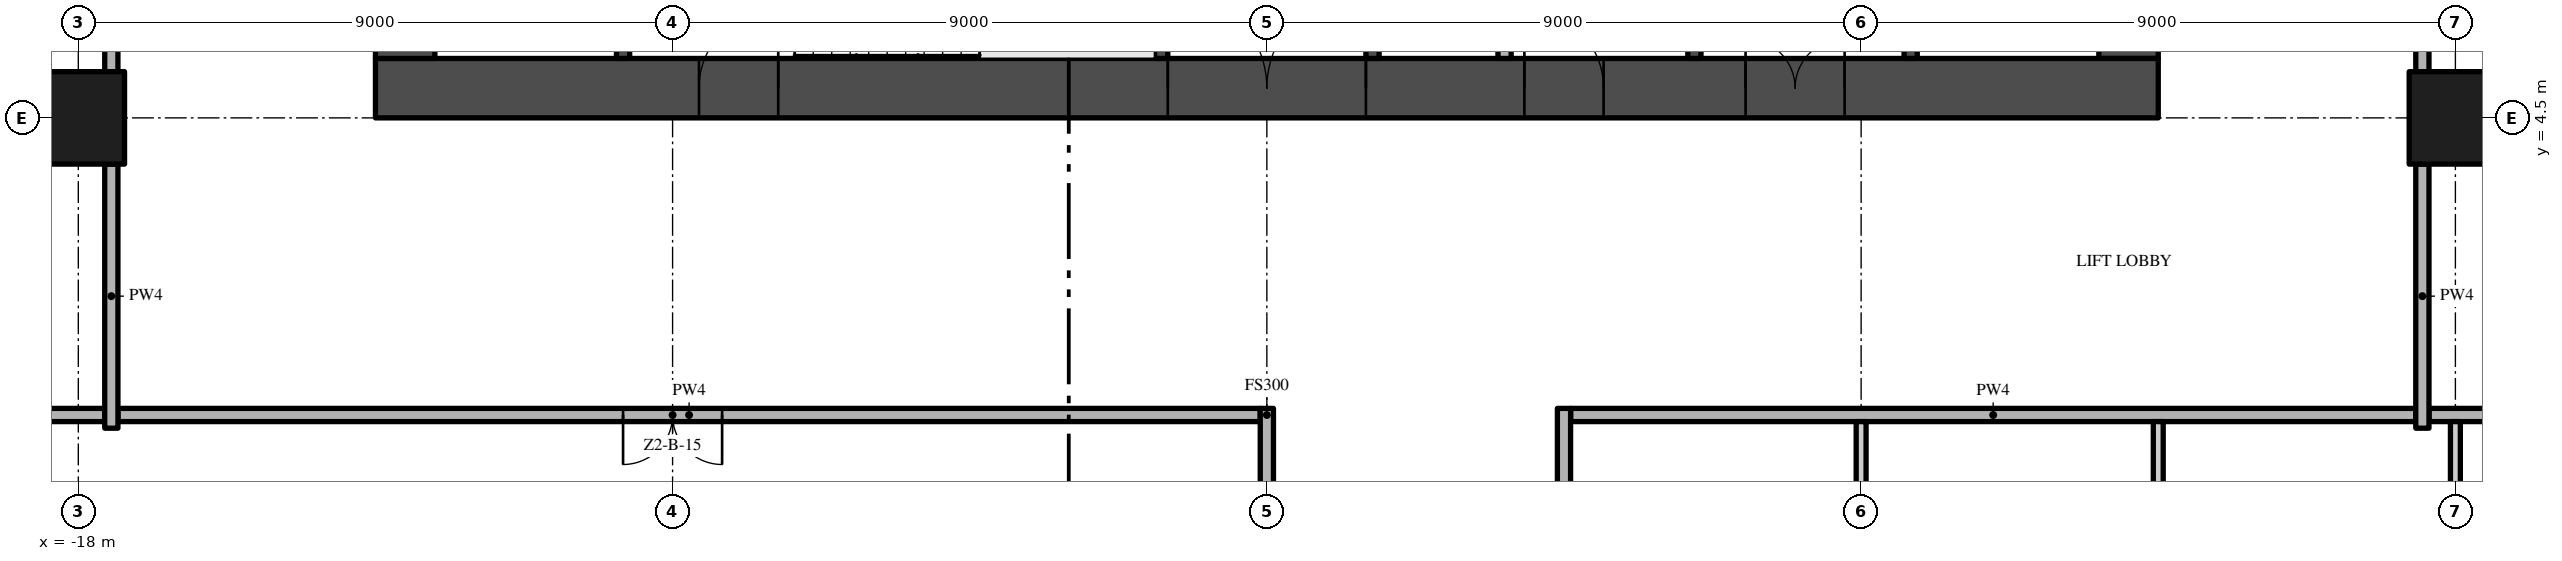
"""IFC4 building model, lengths in metres.
Left out: names, types, materials, properties, quantities, classifications, styles, units other than length and angle.
Written with IfcOpenShell. Run it as: python <this file> out.ifc"""

import sys

from ifc_helpers import new_model, si_unit, direction, frame, frame_2d, origin, origin_2d, place, context, subcontext, project, spatial, rectangle, extrude, element, fill, save


model = new_model("IFC4")
c1 = context("Model", 3, precision=1e-05, world=origin(), true_north=direction((0.0, 1.0)))
c2 = subcontext(c1, "Body", "Model", "MODEL_VIEW")
j1 = project(units=[si_unit("LENGTHUNIT", "METRE"), si_unit("PLANEANGLEUNIT", "RADIAN")], contexts=[c1])
p1 = place(None, origin())
s1 = spatial("IfcSite", under=j1, at=p1, CompositionType="ELEMENT")
p2 = place(p1, origin())
s2 = spatial("IfcBuilding", under=s1, at=p2, CompositionType="ELEMENT")
p3 = place(p2, frame((0.0, 0.0, 88.4)))
s3 = spatial("IfcBuildingStorey", under=s2, at=p3, CompositionType="ELEMENT", Elevation=88.4)
p4 = place(p3, frame((-13.5, 4.95, -0.3), z_axis=(0.0, 0.0, 1.0), x_axis=(1.0, 0.0, 0.0)))
e1 = element("IfcWall", 1, at=p4, inside=s3, PredefinedType="SHEAR", context=c2, shape_type="SweptSolid", body=[
    extrude(rectangle(XDim=27.0, YDim=0.9, at=frame_2d((13.5, 0.0))), origin(), (0.0, 0.0, 1.0), 3.8),
])
p5 = place(p4, frame((12.0, 0.0, 0.3)))
e2 = element("IfcOpeningElement", 2, at=p5, cuts=e1, PredefinedType="OPENING", context=c2, shape_type="SweptSolid", body=[
    extrude(rectangle(XDim=3.0, YDim=2.4, at=frame_2d((1.5, 1.2))), frame((0.0, 0.46, 0.0), z_axis=(0.0, -1.0, 0.0), x_axis=(1.0, 0.0, 0.0)), (0.0, 0.0, 1.0), 0.92),
])
p6 = place(p4, frame((4.9, 0.0, 0.3)))
e3 = element("IfcOpeningElement", 3, at=p6, cuts=e1, PredefinedType="OPENING", context=c2, shape_type="SweptSolid", body=[
    extrude(rectangle(XDim=1.2, YDim=2.2, at=frame_2d((0.6, 1.1))), frame((0.0, 0.46, 0.0), z_axis=(0.0, -1.0, 0.0), x_axis=(1.0, 0.0, 0.0)), (0.0, 0.0, 1.0), 0.92),
])
p7 = place(p4, frame((20.75, 0.0, 0.3)))
e4 = element("IfcOpeningElement", 4, at=p7, cuts=e1, PredefinedType="OPENING", context=c2, shape_type="SweptSolid", body=[
    extrude(rectangle(XDim=1.5, YDim=2.2, at=frame_2d((0.75, 1.1))), frame((0.0, 0.46, 0.0), z_axis=(0.0, -1.0, 0.0), x_axis=(1.0, 0.0, 0.0)), (0.0, 0.0, 1.0), 0.92),
])
p8 = place(p4, frame((17.4, 0.0, 0.3)))
e5 = element("IfcOpeningElement", 5, at=p8, cuts=e1, PredefinedType="OPENING", context=c2, shape_type="SweptSolid", body=[
    extrude(rectangle(XDim=1.2, YDim=2.2, at=frame_2d((0.6, 1.1))), frame((0.0, 0.46, 0.0), z_axis=(0.0, -1.0, 0.0), x_axis=(1.0, 0.0, 0.0)), (0.0, 0.0, 1.0), 0.92),
])
p9 = place(p3, frame((13.05, 5.4, -0.3), z_axis=(0.0, 0.0, 1.0), x_axis=(0.0, 1.0, 0.0)))
e6 = element("IfcWall", 6, at=p9, inside=s3, PredefinedType="SHEAR", context=c2, shape_type="SweptSolid", body=[
    extrude(rectangle(XDim=16.2, YDim=0.9, at=frame_2d((8.1, 0.0))), origin(), (0.0, 0.0, 1.0), 3.8),
])
p10 = place(p9, frame((6.0, 0.0, 0.3)))
e7 = element("IfcOpeningElement", 7, at=p10, cuts=e6, PredefinedType="OPENING", context=c2, shape_type="SweptSolid", body=[
    extrude(rectangle(XDim=1.2, YDim=2.2, at=frame_2d((0.6, 1.1))), frame((0.0, 0.46, 0.0), z_axis=(0.0, -1.0, 0.0), x_axis=(1.0, 0.0, 0.0)), (0.0, 0.0, 1.0), 0.92),
])
p11 = place(p3, frame((-13.05, 21.6, -0.3), z_axis=(0.0, 0.0, 1.0), x_axis=(0.0, -1.0, 0.0)))
e8 = element("IfcWall", 8, at=p11, inside=s3, PredefinedType="SHEAR", context=c2, shape_type="SweptSolid", body=[
    extrude(rectangle(XDim=16.2, YDim=0.9, at=frame_2d((8.1, 0.0))), origin(), (0.0, 0.0, 1.0), 3.8),
])
p12 = place(p11, frame((9.0, 0.0, 0.3)))
e9 = element("IfcOpeningElement", 9, at=p12, cuts=e8, PredefinedType="OPENING", context=c2, shape_type="SweptSolid", body=[
    extrude(rectangle(XDim=1.2, YDim=2.2, at=frame_2d((0.6, 1.1))), frame((0.0, 0.46, 0.0), z_axis=(0.0, -1.0, 0.0), x_axis=(1.0, 0.0, 0.0)), (0.0, 0.0, 1.0), 0.92),
])
for number, where, z_axis, x_axis in (
    (10, (-18.0, 4.5, 0.0), (0.0, 0.0, 1.0), (1.0, 0.0, 0.0)),
    (11, (18.0, 4.5, 0.0), (0.0, 0.0, 1.0), (1.0, 0.0, 0.0)),
):
    element("IfcColumn", number, at=place(p3, frame(where, z_axis=z_axis, x_axis=x_axis)), inside=s3, PredefinedType="COLUMN", context=c2, shape_type="SweptSolid", body=[
        extrude(rectangle(XDim=1.4, YDim=1.4, at=origin_2d()), origin(), (0.0, 0.0, 1.0), 3.5),
    ])
for number, where, z_axis, x_axis in (
    (12, (-9.75, 5.4, 0.0), (0.0, 0.0, 1.0), (0.0, 1.0, 0.0)),
    (13, (-1.6, 5.4, 0.0), (0.0, 0.0, 1.0), (0.0, 1.0, 0.0)),
):
    element("IfcWall", number, at=place(p3, frame(where, z_axis=z_axis, x_axis=x_axis)), inside=s3, PredefinedType="SHEAR", context=c2, shape_type="SweptSolid", body=[
        extrude(rectangle(XDim=2.55, YDim=0.2, at=frame_2d((1.275, 0.0))), origin(), (0.0, 0.0, 1.0), 3.5),
    ])
p13 = place(p3, frame((1.6, 13.5, 0.0), z_axis=(0.0, 0.0, 1.0), x_axis=(0.0, -1.0, 0.0)))
e14 = element("IfcWall", 14, at=p13, inside=s3, PredefinedType="SHEAR", context=c2, shape_type="SweptSolid", body=[
    extrude(rectangle(XDim=8.1, YDim=0.2, at=frame_2d((4.05, 0.0))), origin(), (0.0, 0.0, 1.0), 3.5),
])
p14 = place(p13, frame((3.2, 0.0, 0.0)))
e15 = element("IfcOpeningElement", 15, at=p14, cuts=e14, PredefinedType="OPENING", context=c2, shape_type="SweptSolid", body=[
    extrude(rectangle(XDim=0.9, YDim=2.1, at=frame_2d((0.45, 1.05))), frame((0.0, 0.11, 0.0), z_axis=(0.0, -1.0, 0.0), x_axis=(1.0, 0.0, 0.0)), (0.0, 0.0, 1.0), 0.22),
])
p15 = place(p3, frame((3.6, 13.5, 0.0), z_axis=(0.0, 0.0, 1.0), x_axis=(0.0, -1.0, 0.0)))
e16 = element("IfcWall", 16, at=p15, inside=s3, PredefinedType="PARTITIONING", context=c2, shape_type="SweptSolid", body=[
    extrude(rectangle(XDim=8.1, YDim=0.2, at=frame_2d((4.05, 0.0))), origin(), (0.0, 0.0, 1.0), 3.5),
])
p16 = place(p15, frame((3.6, 0.0, 0.0)))
e17 = element("IfcOpeningElement", 17, at=p16, cuts=e16, PredefinedType="OPENING", context=c2, shape_type="SweptSolid", body=[
    extrude(rectangle(XDim=0.9, YDim=2.1, at=frame_2d((0.45, 1.05))), frame((0.0, 0.11, 0.0), z_axis=(0.0, -1.0, 0.0), x_axis=(1.0, 0.0, 0.0)), (0.0, 0.0, 1.0), 0.22),
])
p17 = place(p3, frame((6.475, 5.4, 0.0), z_axis=(0.0, 0.0, 1.0), x_axis=(0.0, 1.0, 0.0)))
e18 = element("IfcWall", 18, at=p17, inside=s3, PredefinedType="SHEAR", context=c2, shape_type="SweptSolid", body=[
    extrude(rectangle(XDim=6.7, YDim=0.2, at=frame_2d((3.35, 0.0))), origin(), (0.0, 0.0, 1.0), 3.5),
])
p18 = place(p3, frame((9.75, 5.4, 0.0), z_axis=(0.0, 0.0, 1.0), x_axis=(0.0, 1.0, 0.0)))
e19 = element("IfcWall", 19, at=p18, inside=s3, PredefinedType="SHEAR", context=c2, shape_type="SweptSolid", body=[
    extrude(rectangle(XDim=2.2, YDim=0.2, at=frame_2d((1.1, 0.0))), origin(), (0.0, 0.0, 1.0), 3.5),
])
p19 = place(p18, frame((0.55, 0.0, 0.0)))
e20 = element("IfcOpeningElement", 20, at=p19, cuts=e19, PredefinedType="OPENING", context=c2, shape_type="SweptSolid", body=[
    extrude(rectangle(XDim=1.1, YDim=2.1, at=frame_2d((0.55, 1.05))), frame((0.0, 0.11, 0.0), z_axis=(0.0, -1.0, 0.0), x_axis=(1.0, 0.0, 0.0)), (0.0, 0.0, 1.0), 0.22),
])
p20 = place(p3, frame((-0.1, 0.0, 0.0), z_axis=(0.0, 0.0, 1.0), x_axis=(-1.0, 0.0, 0.0)))
e21 = element("IfcWall", 21, at=p20, inside=s3, PredefinedType="PARTITIONING", context=c2, shape_type="SweptSolid", body=[
    extrude(rectangle(XDim=17.3, YDim=0.2, at=frame_2d((8.65, 0.0))), origin(), (0.0, 0.0, 1.0), 3.5),
])
p21 = place(p20, frame((8.15, 0.0, 0.0)))
e22 = element("IfcOpeningElement", 22, at=p21, cuts=e21, PredefinedType="OPENING", context=c2, shape_type="SweptSolid", body=[
    extrude(rectangle(XDim=1.5, YDim=2.4, at=frame_2d((0.75, 1.2))), frame((0.0, 0.11, 0.0), z_axis=(0.0, -1.0, 0.0), x_axis=(1.0, 0.0, 0.0)), (0.0, 0.0, 1.0), 0.22),
])
p22 = place(p3, frame((4.6, 0.0, 0.0), z_axis=(0.0, 0.0, 1.0), x_axis=(1.0, 0.0, 0.0)))
e23 = element("IfcWall", 23, at=p22, inside=s3, PredefinedType="PARTITIONING", context=c2, shape_type="SweptSolid", body=[
    extrude(rectangle(XDim=12.8, YDim=0.2, at=frame_2d((6.4, 0.0))), origin(), (0.0, 0.0, 1.0), 3.5),
])
for number, where, z_axis, x_axis in (
    (24, (-26.7, 0.0, 0.0), (0.0, 0.0, 1.0), (1.0, 0.0, 0.0)),
    (25, (17.6, 0.0, 0.0), (0.0, 0.0, 1.0), (1.0, 0.0, 0.0)),
):
    element("IfcWall", number, at=place(p3, frame(where, z_axis=z_axis, x_axis=x_axis)), inside=s3, PredefinedType="PARTITIONING", context=c2, shape_type="SweptSolid", body=[
        extrude(rectangle(XDim=9.1, YDim=0.2, at=frame_2d((4.55, 0.0))), origin(), (0.0, 0.0, 1.0), 3.5),
    ])
p23 = place(p3, frame((-17.5, -0.2, 0.0), z_axis=(0.0, 0.0, 1.0), x_axis=(0.0, 1.0, 0.0)))
e26 = element("IfcWall", 26, at=p23, inside=s3, PredefinedType="PARTITIONING", context=c2, shape_type="SweptSolid", body=[
    extrude(rectangle(XDim=4.0, YDim=0.2, at=frame_2d((2.0, 0.0))), origin(), (0.0, 0.0, 1.0), 3.5),
])
p24 = place(p3, frame((-17.5, 5.2, 0.0), z_axis=(0.0, 0.0, 1.0), x_axis=(0.0, 1.0, 0.0)))
e27 = element("IfcWall", 27, at=p24, inside=s3, PredefinedType="PARTITIONING", context=c2, shape_type="SweptSolid", body=[
    extrude(rectangle(XDim=7.6, YDim=0.2, at=frame_2d((3.8, 0.0))), origin(), (0.0, 0.0, 1.0), 3.5),
])
p25 = place(p3, frame((0.0, -3.8, 0.0), z_axis=(0.0, 0.0, 1.0), x_axis=(0.0, 1.0, 0.0)))
e28 = element("IfcWall", 28, at=p25, inside=s3, PredefinedType="PARTITIONING", context=c2, shape_type="SweptSolid", body=[
    extrude(rectangle(XDim=3.9, YDim=0.2, at=frame_2d((1.95, 0.0))), origin(), (0.0, 0.0, 1.0), 3.5),
])
p26 = place(p3, frame((4.5, 0.1, 0.0), z_axis=(0.0, 0.0, 1.0), x_axis=(0.0, -1.0, 0.0)))
e29 = element("IfcWall", 29, at=p26, inside=s3, PredefinedType="PARTITIONING", context=c2, shape_type="SweptSolid", body=[
    extrude(rectangle(XDim=22.3, YDim=0.2, at=frame_2d((11.15, 0.0))), origin(), (0.0, 0.0, 1.0), 3.5),
])
p27 = place(p26, frame((10.6, 0.0, 0.0)))
e30 = element("IfcOpeningElement", 30, at=p27, cuts=e29, PredefinedType="OPENING", context=c2, shape_type="SweptSolid", body=[
    extrude(rectangle(XDim=1.5, YDim=2.4, at=frame_2d((0.75, 1.2))), frame((0.0, 0.11, 0.0), z_axis=(0.0, -1.0, 0.0), x_axis=(1.0, 0.0, 0.0)), (0.0, 0.0, 1.0), 0.22),
])
p28 = place(p3, frame((9.0, -3.8, 0.0), z_axis=(0.0, 0.0, 1.0), x_axis=(0.0, 1.0, 0.0)))
e31 = element("IfcWall", 31, at=p28, inside=s3, PredefinedType="PARTITIONING", context=c2, shape_type="SweptSolid", body=[
    extrude(rectangle(XDim=3.7, YDim=0.15, at=frame_2d((1.85, 0.0))), origin(), (0.0, 0.0, 1.0), 3.5),
])
p29 = place(p3, frame((13.5, -9.075, 0.0), z_axis=(0.0, 0.0, 1.0), x_axis=(0.0, 1.0, 0.0)))
e32 = element("IfcWall", 32, at=p29, inside=s3, PredefinedType="PARTITIONING", context=c2, shape_type="SweptSolid", body=[
    extrude(rectangle(XDim=8.975, YDim=0.15, at=frame_2d((4.487, 0.0))), origin(), (0.0, 0.0, 1.0), 3.5),
])
p30 = place(p3, frame((17.5, -0.2, 0.0), z_axis=(0.0, 0.0, 1.0), x_axis=(0.0, 1.0, 0.0)))
e33 = element("IfcWall", 33, at=p30, inside=s3, PredefinedType="PARTITIONING", context=c2, shape_type="SweptSolid", body=[
    extrude(rectangle(XDim=4.0, YDim=0.2, at=frame_2d((2.0, 0.0))), origin(), (0.0, 0.0, 1.0), 3.5),
])
p31 = place(p3, frame((17.5, 12.8, 0.0), z_axis=(0.0, 0.0, 1.0), x_axis=(0.0, -1.0, 0.0)))
e34 = element("IfcWall", 34, at=p31, inside=s3, PredefinedType="PARTITIONING", context=c2, shape_type="SweptSolid", body=[
    extrude(rectangle(XDim=7.6, YDim=0.2, at=frame_2d((3.8, 0.0))), origin(), (0.0, 0.0, 1.0), 3.5),
])
p32 = place(p31, frame((5.45, 0.0, 0.0)))
e35 = element("IfcOpeningElement", 35, at=p32, cuts=e34, PredefinedType="OPENING", context=c2, shape_type="SweptSolid", body=[
    extrude(rectangle(XDim=1.2, YDim=2.4, at=frame_2d((0.6, 1.2))), frame((0.0, 0.11, 0.0), z_axis=(0.0, -1.0, 0.0), x_axis=(1.0, 0.0, 0.0)), (0.0, 0.0, 1.0), 0.22),
])
p33 = place(p3, frame((18.0, -0.1, 0.0), z_axis=(0.0, 0.0, 1.0), x_axis=(0.0, -1.0, 0.0)))
e36 = element("IfcWall", 36, at=p33, inside=s3, PredefinedType="PARTITIONING", context=c2, shape_type="SweptSolid", body=[
    extrude(rectangle(XDim=3.7, YDim=0.15, at=frame_2d((1.85, 0.0))), origin(), (0.0, 0.0, 1.0), 3.5),
])
p34 = place(p33, frame((2.55, 0.0, 0.0)))
e37 = element("IfcOpeningElement", 37, at=p34, cuts=e36, PredefinedType="OPENING", context=c2, shape_type="SweptSolid", body=[
    extrude(rectangle(XDim=1.0, YDim=2.4, at=frame_2d((0.5, 1.2))), frame((0.0, 0.085, 0.0), z_axis=(0.0, -1.0, 0.0), x_axis=(1.0, 0.0, 0.0)), (0.0, 0.0, 1.0), 0.17),
])
p35 = place(p5, frame((3.0, 0.0, 0.0), z_axis=(0.0, 0.0, 1.0), x_axis=(-1.0, 0.0, 0.0)))
e38 = element("IfcDoor", 38, at=p35, inside=s3, OperationType="DOUBLE_DOOR_SINGLE_SWING", PredefinedType="DOOR", context=c2, shape_type="SweptSolid", body=[
    extrude(rectangle(XDim=3.0, YDim=2.4, at=frame_2d((1.5, 1.2))), frame((0.0, 0.025, 0.0), z_axis=(0.0, -1.0, 0.0), x_axis=(1.0, 0.0, 0.0)), (0.0, 0.0, 1.0), 0.05),
])
fill(e2, e38)
p36 = place(p6, frame((1.2, 0.0, 0.0), z_axis=(0.0, 0.0, 1.0), x_axis=(-1.0, 0.0, 0.0)))
e39 = element("IfcDoor", 39, at=p36, inside=s3, OperationType="SINGLE_SWING_LEFT", PredefinedType="DOOR", context=c2, shape_type="SweptSolid", body=[
    extrude(rectangle(XDim=1.2, YDim=2.2, at=frame_2d((0.6, 1.1))), frame((0.0, 0.025, 0.0), z_axis=(0.0, -1.0, 0.0), x_axis=(1.0, 0.0, 0.0)), (0.0, 0.0, 1.0), 0.05),
])
fill(e3, e39)
p37 = place(p7, frame((1.5, 0.0, 0.0), z_axis=(0.0, 0.0, 1.0), x_axis=(-1.0, 0.0, 0.0)))
e40 = element("IfcDoor", 40, at=p37, inside=s3, OperationType="DOUBLE_DOOR_SINGLE_SWING", PredefinedType="DOOR", context=c2, shape_type="SweptSolid", body=[
    extrude(rectangle(XDim=1.5, YDim=2.2, at=frame_2d((0.75, 1.1))), frame((0.0, 0.025, 0.0), z_axis=(0.0, -1.0, 0.0), x_axis=(1.0, 0.0, 0.0)), (0.0, 0.0, 1.0), 0.05),
])
fill(e4, e40)
p38 = place(p8, frame((1.2, 0.0, 0.0), z_axis=(0.0, 0.0, 1.0), x_axis=(-1.0, 0.0, 0.0)))
e41 = element("IfcDoor", 41, at=p38, inside=s3, OperationType="SINGLE_SWING_RIGHT", PredefinedType="DOOR", context=c2, shape_type="SweptSolid", body=[
    extrude(rectangle(XDim=1.2, YDim=2.2, at=frame_2d((0.6, 1.1))), frame((0.0, 0.025, 0.0), z_axis=(0.0, -1.0, 0.0), x_axis=(1.0, 0.0, 0.0)), (0.0, 0.0, 1.0), 0.05),
])
fill(e5, e41)
p39 = place(p21, origin())
e42 = element("IfcDoor", 42, at=p39, inside=s3, OperationType="DOUBLE_DOOR_SINGLE_SWING", PredefinedType="DOOR", context=c2, shape_type="SweptSolid", body=[
    extrude(rectangle(XDim=1.5, YDim=2.4, at=frame_2d((0.75, 1.2))), frame((0.0, 0.025, 0.0), z_axis=(0.0, -1.0, 0.0), x_axis=(1.0, 0.0, 0.0)), (0.0, 0.0, 1.0), 0.05),
])
fill(e22, e42)
save(model, sys.argv[1])
